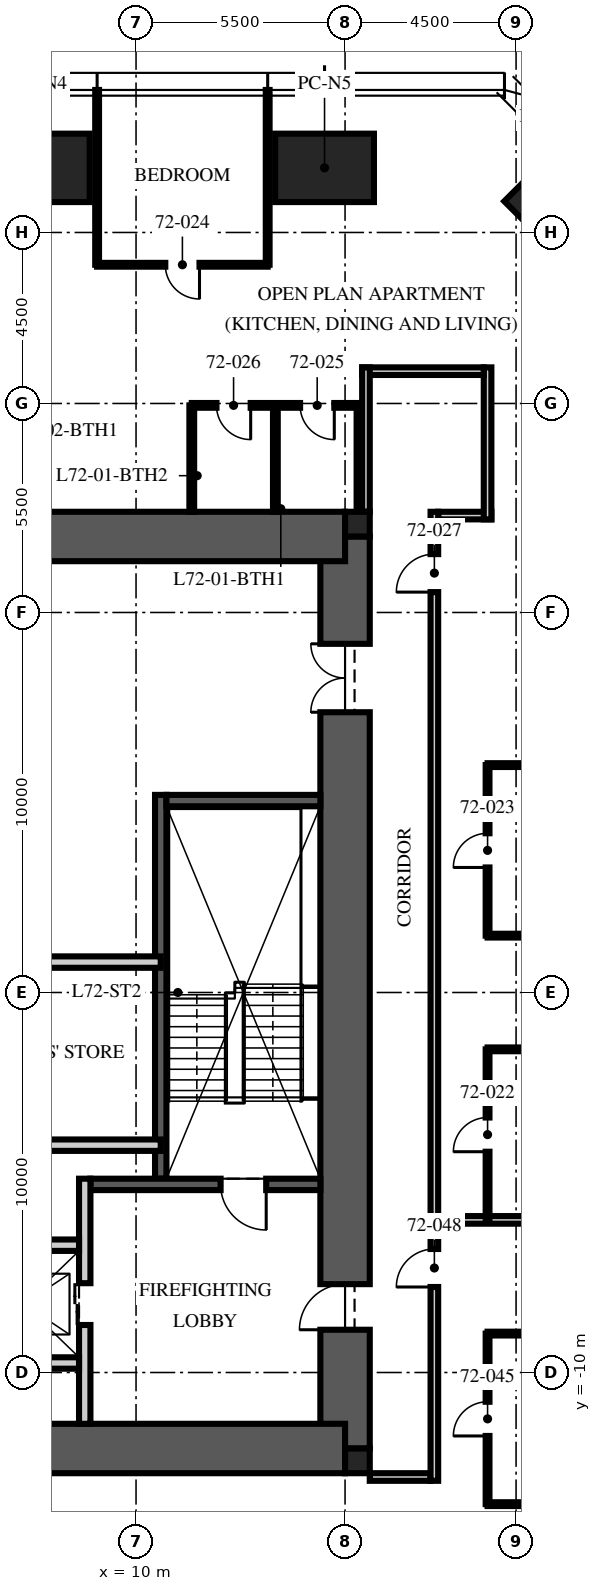
"""IFC4 building model, lengths in metres.
Left out: names, types, materials, properties, quantities, classifications, styles, units other than length and angle.
Written with IfcOpenShell. Run it as: python <this file> out.ifc"""

import sys

from ifc_helpers import new_model, si_unit, direction, frame, frame_2d, origin, origin_2d, place, context, subcontext, project, spatial, rectangle, extrude, element, fill, save


model = new_model("IFC4")
c1 = context("Model", 3, precision=1e-05, world=origin(), true_north=direction((0.0, 1.0)))
c2 = subcontext(c1, "Body", "Model", "MODEL_VIEW")
j1 = project(units=[si_unit("LENGTHUNIT", "METRE"), si_unit("PLANEANGLEUNIT", "RADIAN")], contexts=[c1])
p1 = place(None, origin())
s1 = spatial("IfcSite", under=j1, at=p1, CompositionType="ELEMENT")
p2 = place(p1, origin())
s2 = spatial("IfcBuilding", under=s1, at=p2, CompositionType="ELEMENT")
p3 = place(p2, frame((0.0, 0.0, 289.5)))
s3 = spatial("IfcBuildingStorey", under=s2, at=p3, CompositionType="ELEMENT", Elevation=289.5)
p4 = place(p3, frame((15.5, -12.0, -0.25), z_axis=(0.0, 0.0, 1.0), x_axis=(0.0, 1.0, 0.0)))
e1 = element("IfcWall", 1, at=p4, inside=s3, PredefinedType="SHEAR", context=c2, shape_type="SweptSolid", body=[
    extrude(rectangle(XDim=24.0, YDim=1.3, at=frame_2d((12.0, 0.0))), origin(), (0.0, 0.0, 1.0), 3.75),
])
p5 = place(p4, frame((3.125, 0.0, 0.25)))
e2 = element("IfcOpeningElement", 2, at=p5, cuts=e1, PredefinedType="OPENING", context=c2, shape_type="SweptSolid", body=[
    extrude(rectangle(XDim=1.2, YDim=2.1, at=frame_2d((0.6, 1.05))), frame((0.0, 0.66, 0.0), z_axis=(0.0, -1.0, 0.0), x_axis=(1.0, 0.0, 0.0)), (0.0, 0.0, 1.0), 1.32),
])
p6 = place(p4, frame((19.375, 0.0, 0.25)))
e3 = element("IfcOpeningElement", 3, at=p6, cuts=e1, PredefinedType="OPENING", context=c2, shape_type="SweptSolid", body=[
    extrude(rectangle(XDim=1.8, YDim=2.1, at=frame_2d((0.9, 1.05))), frame((0.0, 0.66, 0.0), z_axis=(0.0, -1.0, 0.0), x_axis=(1.0, 0.0, 0.0)), (0.0, 0.0, 1.0), 1.32),
])
for number, where, z_axis, x_axis in (
    (4, (-15.5, 12.0, -0.25), (0.0, 0.0, 1.0), (1.0, 0.0, 0.0)),
    (5, (-15.5, -12.0, -0.25), (0.0, 0.0, 1.0), (1.0, 0.0, 0.0)),
):
    element("IfcWall", number, at=place(p3, frame(where, z_axis=z_axis, x_axis=x_axis)), inside=s3, PredefinedType="SHEAR", context=c2, shape_type="SweptSolid", body=[
        extrude(rectangle(XDim=31.0, YDim=1.3, at=frame_2d((15.5, 0.0))), origin(), (0.0, 0.0, 1.0), 3.75),
    ])
for number, where, z_axis, x_axis in (
    (6, (15.825, 12.325, -0.25), (0.0, 0.0, 1.0), (1.0, 0.0, 0.0)),
    (7, (15.825, -12.325, -0.25), (0.0, 0.0, 1.0), (1.0, 0.0, 0.0)),
):
    element("IfcColumn", number, at=place(p3, frame(where, z_axis=z_axis, x_axis=x_axis)), inside=s3, PredefinedType="COLUMN", context=c2, shape_type="SweptSolid", body=[
        extrude(rectangle(XDim=0.65, YDim=0.65, at=origin_2d()), origin(), (0.0, 0.0, 1.0), 3.75),
    ])
for number, where, z_axis, x_axis in (
    (8, (7.48, 21.7, 0.0), (0.0, 0.0, 1.0), (1.0, 0.0, 0.0)),
    (9, (14.96, 21.7, 0.0), (0.0, 0.0, 1.0), (1.0, 0.0, 0.0)),
):
    element("IfcColumn", number, at=place(p3, frame(where, z_axis=z_axis, x_axis=x_axis)), inside=s3, PredefinedType="COLUMN", context=c2, shape_type="SweptSolid", body=[
        extrude(rectangle(XDim=2.6, YDim=1.8, at=origin_2d()), origin(), (0.0, 0.0, 1.0), 3.75),
    ])
p7 = place(p3, frame((20.821, 20.821, 0.0), z_axis=(0.0, 0.0, 1.0), x_axis=(0.707106781187, -0.707106781187, 0.0)))
e10 = element("IfcColumn", 10, at=p7, inside=s3, PredefinedType="COLUMN", context=c2, shape_type="SweptSolid", body=[
    extrude(rectangle(XDim=1.6, YDim=1.6, at=origin_2d()), origin(), (0.0, 0.0, 1.0), 3.75),
])
p8 = place(p3, frame((10.65, -4.9, 0.0), z_axis=(0.0, 0.0, 1.0), x_axis=(0.0, 1.0, 0.0)))
e11 = element("IfcWall", 11, at=p8, inside=s3, PredefinedType="SOLIDWALL", context=c2, shape_type="SweptSolid", body=[
    extrude(rectangle(XDim=10.1, YDim=0.3, at=frame_2d((5.05, 0.0))), origin(), (0.0, 0.0, 1.0), 3.5),
])
p9 = place(p3, frame((14.85, -5.05, 0.0), z_axis=(0.0, 0.0, 1.0), x_axis=(-1.0, 0.0, 0.0)))
e12 = element("IfcWall", 12, at=p9, inside=s3, PredefinedType="SOLIDWALL", context=c2, shape_type="SweptSolid", body=[
    extrude(rectangle(XDim=6.05, YDim=0.3, at=frame_2d((3.025, 0.0))), origin(), (0.0, 0.0, 1.0), 3.5),
])
p10 = place(p9, frame((1.425, 0.0, 0.0)))
e13 = element("IfcOpeningElement", 13, at=p10, cuts=e12, PredefinedType="OPENING", context=c2, shape_type="SweptSolid", body=[
    extrude(rectangle(XDim=1.2, YDim=2.1, at=frame_2d((0.6, 1.05))), frame((0.0, 0.16, 0.0), z_axis=(0.0, -1.0, 0.0), x_axis=(1.0, 0.0, 0.0)), (0.0, 0.0, 1.0), 0.32),
])
p11 = place(p3, frame((14.85, 5.05, 0.0), z_axis=(0.0, 0.0, 1.0), x_axis=(-1.0, 0.0, 0.0)))
e14 = element("IfcWall", 14, at=p11, inside=s3, PredefinedType="SOLIDWALL", context=c2, shape_type="SweptSolid", body=[
    extrude(rectangle(XDim=4.05, YDim=0.3, at=frame_2d((2.025, 0.0))), origin(), (0.0, 0.0, 1.0), 3.5),
])
p12 = place(p3, frame((8.65, -11.35, 0.0), z_axis=(0.0, 0.0, 1.0), x_axis=(0.0, 1.0, 0.0)))
e15 = element("IfcWall", 15, at=p12, inside=s3, PredefinedType="PARTITIONING", context=c2, shape_type="SweptSolid", body=[
    extrude(rectangle(XDim=6.45, YDim=0.3, at=frame_2d((3.225, 0.0))), origin(), (0.0, 0.0, 1.0), 3.5),
])
p13 = place(p12, frame((2.6, 0.0, 0.0)))
e16 = element("IfcOpeningElement", 16, at=p13, cuts=e15, PredefinedType="OPENING", context=c2, shape_type="SweptSolid", body=[
    extrude(rectangle(XDim=1.1, YDim=2.1, at=frame_2d((0.55, 1.05))), frame((0.0, 0.16, 0.0), z_axis=(0.0, -1.0, 0.0), x_axis=(1.0, 0.0, 0.0)), (0.0, 0.0, 1.0), 0.32),
])
p14 = place(p3, frame((-8.5, -6.65, 0.0), z_axis=(0.0, 0.0, 1.0), x_axis=(1.0, 0.0, 0.0)))
e17 = element("IfcWall", 17, at=p14, inside=s3, PredefinedType="PARTITIONING", context=c2, shape_type="SweptSolid", body=[
    extrude(rectangle(XDim=17.0, YDim=0.3, at=frame_2d((8.5, 0.0))), origin(), (0.0, 0.0, 1.0), 3.5),
])
p15 = place(p14, frame((7.8, 0.0, 0.0)))
e18 = element("IfcOpeningElement", 18, at=p15, cuts=e17, PredefinedType="OPENING", context=c2, shape_type="SweptSolid", body=[
    extrude(rectangle(XDim=1.3, YDim=2.4, at=frame_2d((0.65, 1.2))), frame((0.0, 0.16, 0.0), z_axis=(0.0, -1.0, 0.0), x_axis=(1.0, 0.0, 0.0)), (0.0, 0.0, 1.0), 0.32),
])
p16 = place(p14, frame((5.65, 0.0, 0.0)))
e19 = element("IfcOpeningElement", 19, at=p16, cuts=e17, PredefinedType="OPENING", context=c2, shape_type="SweptSolid", body=[
    extrude(rectangle(XDim=0.9, YDim=2.1, at=frame_2d((0.45, 1.05))), frame((0.0, 0.16, 0.0), z_axis=(0.0, -1.0, 0.0), x_axis=(1.0, 0.0, 0.0)), (0.0, 0.0, 1.0), 0.32),
])
p17 = place(p14, frame((10.4, 0.0, 0.0)))
e20 = element("IfcOpeningElement", 20, at=p17, cuts=e17, PredefinedType="OPENING", context=c2, shape_type="SweptSolid", body=[
    extrude(rectangle(XDim=0.9, YDim=2.1, at=frame_2d((0.45, 1.05))), frame((0.0, 0.16, 0.0), z_axis=(0.0, -1.0, 0.0), x_axis=(1.0, 0.0, 0.0)), (0.0, 0.0, 1.0), 0.32),
])
p18 = place(p3, frame((5.6, -9.75, 0.0), z_axis=(0.0, 0.0, 1.0), x_axis=(1.0, 0.0, 0.0)))
e21 = element("IfcWall", 21, at=p18, inside=s3, PredefinedType="PARTITIONING", context=c2, shape_type="SweptSolid", body=[
    extrude(rectangle(XDim=2.9, YDim=0.3, at=frame_2d((1.45, 0.0))), origin(), (0.0, 0.0, 1.0), 3.5),
])
p19 = place(p3, frame((-10.65, 0.8, 0.0), z_axis=(0.0, 0.0, 1.0), x_axis=(1.0, 0.0, 0.0)))
e22 = element("IfcWall", 22, at=p19, inside=s3, PredefinedType="PARTITIONING", context=c2, shape_type="SweptSolid", body=[
    extrude(rectangle(XDim=21.3, YDim=0.3, at=frame_2d((10.65, 0.0))), origin(), (0.0, 0.0, 1.0), 3.5),
])
p20 = place(p19, frame((10.05, 0.0, 0.0)))
e23 = element("IfcOpeningElement", 23, at=p20, cuts=e22, PredefinedType="OPENING", context=c2, shape_type="SweptSolid", body=[
    extrude(rectangle(XDim=1.2, YDim=2.1, at=frame_2d((0.6, 1.05))), frame((0.0, 0.16, 0.0), z_axis=(0.0, -1.0, 0.0), x_axis=(1.0, 0.0, 0.0)), (0.0, 0.0, 1.0), 0.32),
])
p21 = place(p19, frame((0.793, 0.0, 0.0)))
e24 = element("IfcOpeningElement", 24, at=p21, cuts=e22, PredefinedType="OPENING", context=c2, shape_type="SweptSolid", body=[
    extrude(rectangle(XDim=0.9, YDim=2.1, at=frame_2d((0.45, 1.05))), frame((0.0, 0.16, 0.0), z_axis=(0.0, -1.0, 0.0), x_axis=(1.0, 0.0, 0.0)), (0.0, 0.0, 1.0), 0.32),
])
p22 = place(p3, frame((10.65, -4.018, 0.0), z_axis=(0.0, 0.0, 1.0), x_axis=(-1.0, 0.0, 0.0)))
e25 = element("IfcWall", 25, at=p22, inside=s3, PredefinedType="PARTITIONING", context=c2, shape_type="SweptSolid", body=[
    extrude(rectangle(XDim=6.45, YDim=0.3, at=frame_2d((3.225, 0.0))), origin(), (0.0, 0.0, 1.0), 3.5),
])
p23 = place(p3, frame((17.95, 12.55, 0.0), z_axis=(0.0, 0.0, 1.0), x_axis=(1.0, 0.0, 0.0)))
e26 = element("IfcWall", 26, at=p23, inside=s3, PredefinedType="PARTITIONING", context=c2, shape_type="SweptSolid", body=[
    extrude(rectangle(XDim=1.4, YDim=0.2, at=frame_2d((0.7, 0.0))), origin(), (0.0, 0.0, 1.0), 3.5),
])
p24 = place(p3, frame((19.25, 12.45, 0.0), z_axis=(0.0, 0.0, 1.0), x_axis=(0.0, 1.0, 0.0)))
e27 = element("IfcWall", 27, at=p24, inside=s3, PredefinedType="PARTITIONING", context=c2, shape_type="SweptSolid", body=[
    extrude(rectangle(XDim=4.0, YDim=0.2, at=frame_2d((2.0, 0.0))), origin(), (0.0, 0.0, 1.0), 2.9),
])
p25 = place(p3, frame((19.15, 16.35, 0.0), z_axis=(0.0, 0.0, 1.0), x_axis=(-1.0, 0.0, 0.0)))
e28 = element("IfcWall", 28, at=p25, inside=s3, PredefinedType="PARTITIONING", context=c2, shape_type="SweptSolid", body=[
    extrude(rectangle(XDim=3.2, YDim=0.2, at=frame_2d((1.6, 0.0))), origin(), (0.0, 0.0, 1.0), 2.6),
])
p26 = place(p3, frame((16.05, 16.45, 0.0), z_axis=(0.0, 0.0, 1.0), x_axis=(0.0, -1.0, 0.0)))
e29 = element("IfcWall", 29, at=p26, inside=s3, PredefinedType="PARTITIONING", context=c2, shape_type="SweptSolid", body=[
    extrude(rectangle(XDim=3.8, YDim=0.2, at=frame_2d((1.9, 0.0))), origin(), (0.0, 0.0, 1.0), 2.6),
])
p27 = place(p3, frame((16.15, -12.75, 0.0), z_axis=(0.0, 0.0, 1.0), x_axis=(1.0, 0.0, 0.0)))
e30 = element("IfcWall", 30, at=p27, inside=s3, PredefinedType="PARTITIONING", context=c2, shape_type="SweptSolid", body=[
    extrude(rectangle(XDim=1.6, YDim=0.2, at=frame_2d((0.8, 0.0))), origin(), (0.0, 0.0, 1.0), 2.6),
])
p28 = place(p3, frame((17.95, -5.984, 0.0), z_axis=(0.0, 0.0, 1.0), x_axis=(1.0, 0.0, 0.0)))
e31 = element("IfcWall", 31, at=p28, inside=s3, PredefinedType="PARTITIONING", context=c2, shape_type="SweptSolid", body=[
    extrude(rectangle(XDim=5.8, YDim=0.2, at=frame_2d((2.9, 0.0))), origin(), (0.0, 0.0, 1.0), 3.01),
])
for number, where, z_axis, x_axis in (
    (32, (19.25, -1.496, 0.0), (0.0, 0.0, 1.0), (1.0, 0.0, 0.0)),
    (33, (19.25, 1.496, 0.0), (0.0, 0.0, 1.0), (1.0, 0.0, 0.0)),
    (34, (19.25, 5.984, 0.0), (0.0, 0.0, 1.0), (1.0, 0.0, 0.0)),
):
    element("IfcWall", number, at=place(p3, frame(where, z_axis=z_axis, x_axis=x_axis)), inside=s3, PredefinedType="PARTITIONING", context=c2, shape_type="SweptSolid", body=[
        extrude(rectangle(XDim=4.5, YDim=0.1, at=frame_2d((2.25, 0.0))), origin(), (0.0, 0.0, 1.0), 3.01),
    ])
for number, where, z_axis, x_axis in (
    (35, (13.464, 19.15, 0.0), (0.0, 0.0, 1.0), (0.0, 1.0, 0.0)),
    (36, (8.976, 19.15, 0.0), (0.0, 0.0, 1.0), (0.0, 1.0, 0.0)),
):
    element("IfcWall", number, at=place(p3, frame(where, z_axis=z_axis, x_axis=x_axis)), inside=s3, PredefinedType="PARTITIONING", context=c2, shape_type="SweptSolid", body=[
        extrude(rectangle(XDim=4.6, YDim=0.1, at=frame_2d((2.3, 0.0))), origin(), (0.0, 0.0, 1.0), 3.01),
    ])
for number, where, z_axis, x_axis in (
    (37, (19.25, -13.464, 0.0), (0.0, 0.0, 1.0), (1.0, 0.0, 0.0)),
    (38, (19.25, -8.976, 0.0), (0.0, 0.0, 1.0), (1.0, 0.0, 0.0)),
):
    element("IfcWall", number, at=place(p3, frame(where, z_axis=z_axis, x_axis=x_axis)), inside=s3, PredefinedType="PARTITIONING", context=c2, shape_type="SweptSolid", body=[
        extrude(rectangle(XDim=4.5, YDim=0.1, at=frame_2d((2.25, 0.0))), origin(), (0.0, 0.0, 1.0), 3.01),
    ])
p29 = place(p3, frame((19.25, -5.984, 0.0), z_axis=(0.0, 0.0, 1.0), x_axis=(0.0, 1.0, 0.0)))
e39 = element("IfcWall", 39, at=p29, inside=s3, PredefinedType="PARTITIONING", context=c2, shape_type="SweptSolid", body=[
    extrude(rectangle(XDim=4.488, YDim=0.1, at=frame_2d((2.244, 0.0))), origin(), (0.0, 0.0, 1.0), 2.91),
])
p30 = place(p29, frame((1.794, 0.0, 0.0)))
e40 = element("IfcOpeningElement", 40, at=p30, cuts=e39, PredefinedType="OPENING", context=c2, shape_type="SweptSolid", body=[
    extrude(rectangle(XDim=0.9, YDim=2.1, at=frame_2d((0.45, 1.05))), frame((0.0, 0.06, 0.0), z_axis=(0.0, -1.0, 0.0), x_axis=(1.0, 0.0, 0.0)), (0.0, 0.0, 1.0), 0.12),
])
p31 = place(p3, frame((19.25, 1.496, 0.0), z_axis=(0.0, 0.0, 1.0), x_axis=(0.0, 1.0, 0.0)))
e41 = element("IfcWall", 41, at=p31, inside=s3, PredefinedType="PARTITIONING", context=c2, shape_type="SweptSolid", body=[
    extrude(rectangle(XDim=4.488, YDim=0.1, at=frame_2d((2.244, 0.0))), origin(), (0.0, 0.0, 1.0), 2.91),
])
p32 = place(p31, frame((1.794, 0.0, 0.0)))
e42 = element("IfcOpeningElement", 42, at=p32, cuts=e41, PredefinedType="OPENING", context=c2, shape_type="SweptSolid", body=[
    extrude(rectangle(XDim=0.9, YDim=2.1, at=frame_2d((0.45, 1.05))), frame((0.0, 0.06, 0.0), z_axis=(0.0, -1.0, 0.0), x_axis=(1.0, 0.0, 0.0)), (0.0, 0.0, 1.0), 0.12),
])
p33 = place(p3, frame((13.464, 19.15, 0.0), z_axis=(0.0, 0.0, 1.0), x_axis=(-1.0, 0.0, 0.0)))
e43 = element("IfcWall", 43, at=p33, inside=s3, PredefinedType="PARTITIONING", context=c2, shape_type="SweptSolid", body=[
    extrude(rectangle(XDim=4.488, YDim=0.1, at=frame_2d((2.244, 0.0))), origin(), (0.0, 0.0, 1.0), 2.91),
])
p34 = place(p33, frame((1.794, 0.0, 0.0)))
e44 = element("IfcOpeningElement", 44, at=p34, cuts=e43, PredefinedType="OPENING", context=c2, shape_type="SweptSolid", body=[
    extrude(rectangle(XDim=0.9, YDim=2.1, at=frame_2d((0.45, 1.05))), frame((0.0, 0.06, 0.0), z_axis=(0.0, -1.0, 0.0), x_axis=(1.0, 0.0, 0.0)), (0.0, 0.0, 1.0), 0.12),
])
p35 = place(p3, frame((15.866, 15.45, 0.0), z_axis=(0.0, 0.0, 1.0), x_axis=(-1.0, 0.0, 0.0)))
e45 = element("IfcWall", 45, at=p35, inside=s3, PredefinedType="PARTITIONING", context=c2, shape_type="SweptSolid", body=[
    extrude(rectangle(XDim=4.4, YDim=0.125, at=frame_2d((2.2, 0.0))), origin(), (0.0, 0.0, 1.0), 2.9),
])
p36 = place(p35, frame((0.65, 0.0, 0.0)))
e46 = element("IfcOpeningElement", 46, at=p36, cuts=e45, PredefinedType="OPENING", context=c2, shape_type="SweptSolid", body=[
    extrude(rectangle(XDim=0.9, YDim=2.1, at=frame_2d((0.45, 1.05))), frame((0.0, 0.073, 0.0), z_axis=(0.0, -1.0, 0.0), x_axis=(1.0, 0.0, 0.0)), (0.0, 0.0, 1.0), 0.145),
])
p37 = place(p35, frame((2.85, 0.0, 0.0)))
e47 = element("IfcOpeningElement", 47, at=p37, cuts=e45, PredefinedType="OPENING", context=c2, shape_type="SweptSolid", body=[
    extrude(rectangle(XDim=0.9, YDim=2.1, at=frame_2d((0.45, 1.05))), frame((0.0, 0.073, 0.0), z_axis=(0.0, -1.0, 0.0), x_axis=(1.0, 0.0, 0.0)), (0.0, 0.0, 1.0), 0.145),
])
p38 = place(p3, frame((15.866, 12.65, 0.0), z_axis=(0.0, 0.0, 1.0), x_axis=(0.0, 1.0, 0.0)))
e48 = element("IfcWall", 48, at=p38, inside=s3, PredefinedType="PARTITIONING", context=c2, shape_type="SweptSolid", body=[
    extrude(rectangle(XDim=2.8, YDim=0.125, at=frame_2d((1.4, 0.0))), origin(), (0.0, 0.0, 1.0), 2.6),
])
for number, where, z_axis, x_axis in (
    (49, (13.667, 12.65, 0.0), (0.0, 0.0, 1.0), (0.0, 1.0, 0.0)),
    (50, (11.467, 12.65, 0.0), (0.0, 0.0, 1.0), (0.0, 1.0, 0.0)),
):
    element("IfcWall", number, at=place(p3, frame(where, z_axis=z_axis, x_axis=x_axis)), inside=s3, PredefinedType="PARTITIONING", context=c2, shape_type="SweptSolid", body=[
        extrude(rectangle(XDim=2.8, YDim=0.125, at=frame_2d((1.4, 0.0))), origin(), (0.0, 0.0, 1.0), 3.5),
    ])
p39 = place(p3, frame((19.25, -13.464, 0.0), z_axis=(0.0, 0.0, 1.0), x_axis=(0.0, 1.0, 0.0)))
e51 = element("IfcWall", 51, at=p39, inside=s3, PredefinedType="PARTITIONING", context=c2, shape_type="SweptSolid", body=[
    extrude(rectangle(XDim=4.488, YDim=0.1, at=frame_2d((2.244, 0.0))), origin(), (0.0, 0.0, 1.0), 2.91),
])
p40 = place(p39, frame((1.794, 0.0, 0.0)))
e52 = element("IfcOpeningElement", 52, at=p40, cuts=e51, PredefinedType="OPENING", context=c2, shape_type="SweptSolid", body=[
    extrude(rectangle(XDim=0.9, YDim=2.1, at=frame_2d((0.45, 1.05))), frame((0.0, 0.06, 0.0), z_axis=(0.0, -1.0, 0.0), x_axis=(1.0, 0.0, 0.0)), (0.0, 0.0, 1.0), 0.12),
])
p41 = place(p3, frame((17.85, -12.85, 0.0), z_axis=(0.0, 0.0, 1.0), x_axis=(0.0, 1.0, 0.0)))
e53 = element("IfcWall", 53, at=p41, inside=s3, PredefinedType="PARTITIONING", context=c2, shape_type="SweptSolid", body=[
    extrude(rectangle(XDim=25.5, YDim=0.2, at=frame_2d((12.75, 0.0))), origin(), (0.0, 0.0, 1.0), 2.9),
])
p42 = place(p41, frame((23.386, 0.0, 0.0)))
e54 = element("IfcOpeningElement", 54, at=p42, cuts=e53, PredefinedType="OPENING", context=c2, shape_type="SweptSolid", body=[
    extrude(rectangle(XDim=1.0, YDim=2.2, at=frame_2d((0.5, 1.1))), frame((0.0, 0.11, 0.0), z_axis=(0.0, -1.0, 0.0), x_axis=(1.0, 0.0, 0.0)), (0.0, 0.0, 1.0), 0.22),
])
p43 = place(p41, frame((5.1, 0.0, 0.0)))
e55 = element("IfcOpeningElement", 55, at=p43, cuts=e53, PredefinedType="OPENING", context=c2, shape_type="SweptSolid", body=[
    extrude(rectangle(XDim=1.0, YDim=2.2, at=frame_2d((0.5, 1.1))), frame((0.0, 0.11, 0.0), z_axis=(0.0, -1.0, 0.0), x_axis=(1.0, 0.0, 0.0)), (0.0, 0.0, 1.0), 0.22),
])
p44 = place(p10, origin())
e56 = element("IfcDoor", 56, at=p44, inside=s3, OperationType="SINGLE_SWING_LEFT", PredefinedType="DOOR", context=c2, shape_type="SweptSolid", body=[
    extrude(rectangle(XDim=1.2, YDim=2.1, at=frame_2d((0.6, 1.05))), frame((0.0, 0.025, 0.0), z_axis=(0.0, -1.0, 0.0), x_axis=(1.0, 0.0, 0.0)), (0.0, 0.0, 1.0), 0.05),
])
fill(e13, e56)
p45 = place(p5, origin())
e57 = element("IfcDoor", 57, at=p45, inside=s3, OperationType="SINGLE_SWING_LEFT", PredefinedType="DOOR", context=c2, shape_type="SweptSolid", body=[
    extrude(rectangle(XDim=1.2, YDim=2.1, at=frame_2d((0.6, 1.05))), frame((0.0, 0.025, 0.0), z_axis=(0.0, -1.0, 0.0), x_axis=(1.0, 0.0, 0.0)), (0.0, 0.0, 1.0), 0.05),
])
fill(e2, e57)
p46 = place(p6, origin())
e58 = element("IfcDoor", 58, at=p46, inside=s3, OperationType="DOUBLE_DOOR_SINGLE_SWING", PredefinedType="DOOR", context=c2, shape_type="SweptSolid", body=[
    extrude(rectangle(XDim=1.8, YDim=2.1, at=frame_2d((0.9, 1.05))), frame((0.0, 0.025, 0.0), z_axis=(0.0, -1.0, 0.0), x_axis=(1.0, 0.0, 0.0)), (0.0, 0.0, 1.0), 0.05),
])
fill(e3, e58)
p47 = place(p13, origin())
e59 = element("IfcDoor", 59, at=p47, inside=s3, OperationType="DOUBLE_DOOR_SLIDING", PredefinedType="DOOR", context=c2, shape_type="SweptSolid", body=[
    extrude(rectangle(XDim=1.1, YDim=2.1, at=frame_2d((0.55, 1.05))), frame((0.0, 0.025, 0.0), z_axis=(0.0, -1.0, 0.0), x_axis=(1.0, 0.0, 0.0)), (0.0, 0.0, 1.0), 0.05),
])
fill(e16, e59)
p48 = place(p30, origin())
e60 = element("IfcDoor", 60, at=p48, inside=s3, OperationType="SINGLE_SWING_LEFT", PredefinedType="DOOR", context=c2, shape_type="SweptSolid", body=[
    extrude(rectangle(XDim=0.9, YDim=2.1, at=frame_2d((0.45, 1.05))), frame((0.0, 0.025, 0.0), z_axis=(0.0, -1.0, 0.0), x_axis=(1.0, 0.0, 0.0)), (0.0, 0.0, 1.0), 0.05),
])
fill(e40, e60)
p49 = place(p32, origin())
e61 = element("IfcDoor", 61, at=p49, inside=s3, OperationType="SINGLE_SWING_LEFT", PredefinedType="DOOR", context=c2, shape_type="SweptSolid", body=[
    extrude(rectangle(XDim=0.9, YDim=2.1, at=frame_2d((0.45, 1.05))), frame((0.0, 0.025, 0.0), z_axis=(0.0, -1.0, 0.0), x_axis=(1.0, 0.0, 0.0)), (0.0, 0.0, 1.0), 0.05),
])
fill(e42, e61)
p50 = place(p34, origin())
e62 = element("IfcDoor", 62, at=p50, inside=s3, OperationType="SINGLE_SWING_LEFT", PredefinedType="DOOR", context=c2, shape_type="SweptSolid", body=[
    extrude(rectangle(XDim=0.9, YDim=2.1, at=frame_2d((0.45, 1.05))), frame((0.0, 0.025, 0.0), z_axis=(0.0, -1.0, 0.0), x_axis=(1.0, 0.0, 0.0)), (0.0, 0.0, 1.0), 0.05),
])
fill(e44, e62)
p51 = place(p36, origin())
e63 = element("IfcDoor", 63, at=p51, inside=s3, OperationType="SINGLE_SWING_LEFT", PredefinedType="DOOR", context=c2, shape_type="SweptSolid", body=[
    extrude(rectangle(XDim=0.9, YDim=2.1, at=frame_2d((0.45, 1.05))), frame((0.0, 0.025, 0.0), z_axis=(0.0, -1.0, 0.0), x_axis=(1.0, 0.0, 0.0)), (0.0, 0.0, 1.0), 0.05),
])
fill(e46, e63)
p52 = place(p37, origin())
e64 = element("IfcDoor", 64, at=p52, inside=s3, OperationType="SINGLE_SWING_LEFT", PredefinedType="DOOR", context=c2, shape_type="SweptSolid", body=[
    extrude(rectangle(XDim=0.9, YDim=2.1, at=frame_2d((0.45, 1.05))), frame((0.0, 0.025, 0.0), z_axis=(0.0, -1.0, 0.0), x_axis=(1.0, 0.0, 0.0)), (0.0, 0.0, 1.0), 0.05),
])
fill(e47, e64)
p53 = place(p42, origin())
e65 = element("IfcDoor", 65, at=p53, inside=s3, OperationType="SINGLE_SWING_LEFT", PredefinedType="DOOR", context=c2, shape_type="SweptSolid", body=[
    extrude(rectangle(XDim=1.0, YDim=2.2, at=frame_2d((0.5, 1.1))), frame((0.0, 0.025, 0.0), z_axis=(0.0, -1.0, 0.0), x_axis=(1.0, 0.0, 0.0)), (0.0, 0.0, 1.0), 0.05),
])
fill(e54, e65)
p54 = place(p40, origin())
e66 = element("IfcDoor", 66, at=p54, inside=s3, OperationType="SINGLE_SWING_LEFT", PredefinedType="DOOR", context=c2, shape_type="SweptSolid", body=[
    extrude(rectangle(XDim=0.9, YDim=2.1, at=frame_2d((0.45, 1.05))), frame((0.0, 0.025, 0.0), z_axis=(0.0, -1.0, 0.0), x_axis=(1.0, 0.0, 0.0)), (0.0, 0.0, 1.0), 0.05),
])
fill(e52, e66)
p55 = place(p43, origin())
e67 = element("IfcDoor", 67, at=p55, inside=s3, OperationType="SINGLE_SWING_LEFT", PredefinedType="DOOR", context=c2, shape_type="SweptSolid", body=[
    extrude(rectangle(XDim=1.0, YDim=2.2, at=frame_2d((0.5, 1.1))), frame((0.0, 0.025, 0.0), z_axis=(0.0, -1.0, 0.0), x_axis=(1.0, 0.0, 0.0)), (0.0, 0.0, 1.0), 0.05),
])
fill(e55, e67)
save(model, sys.argv[1])
